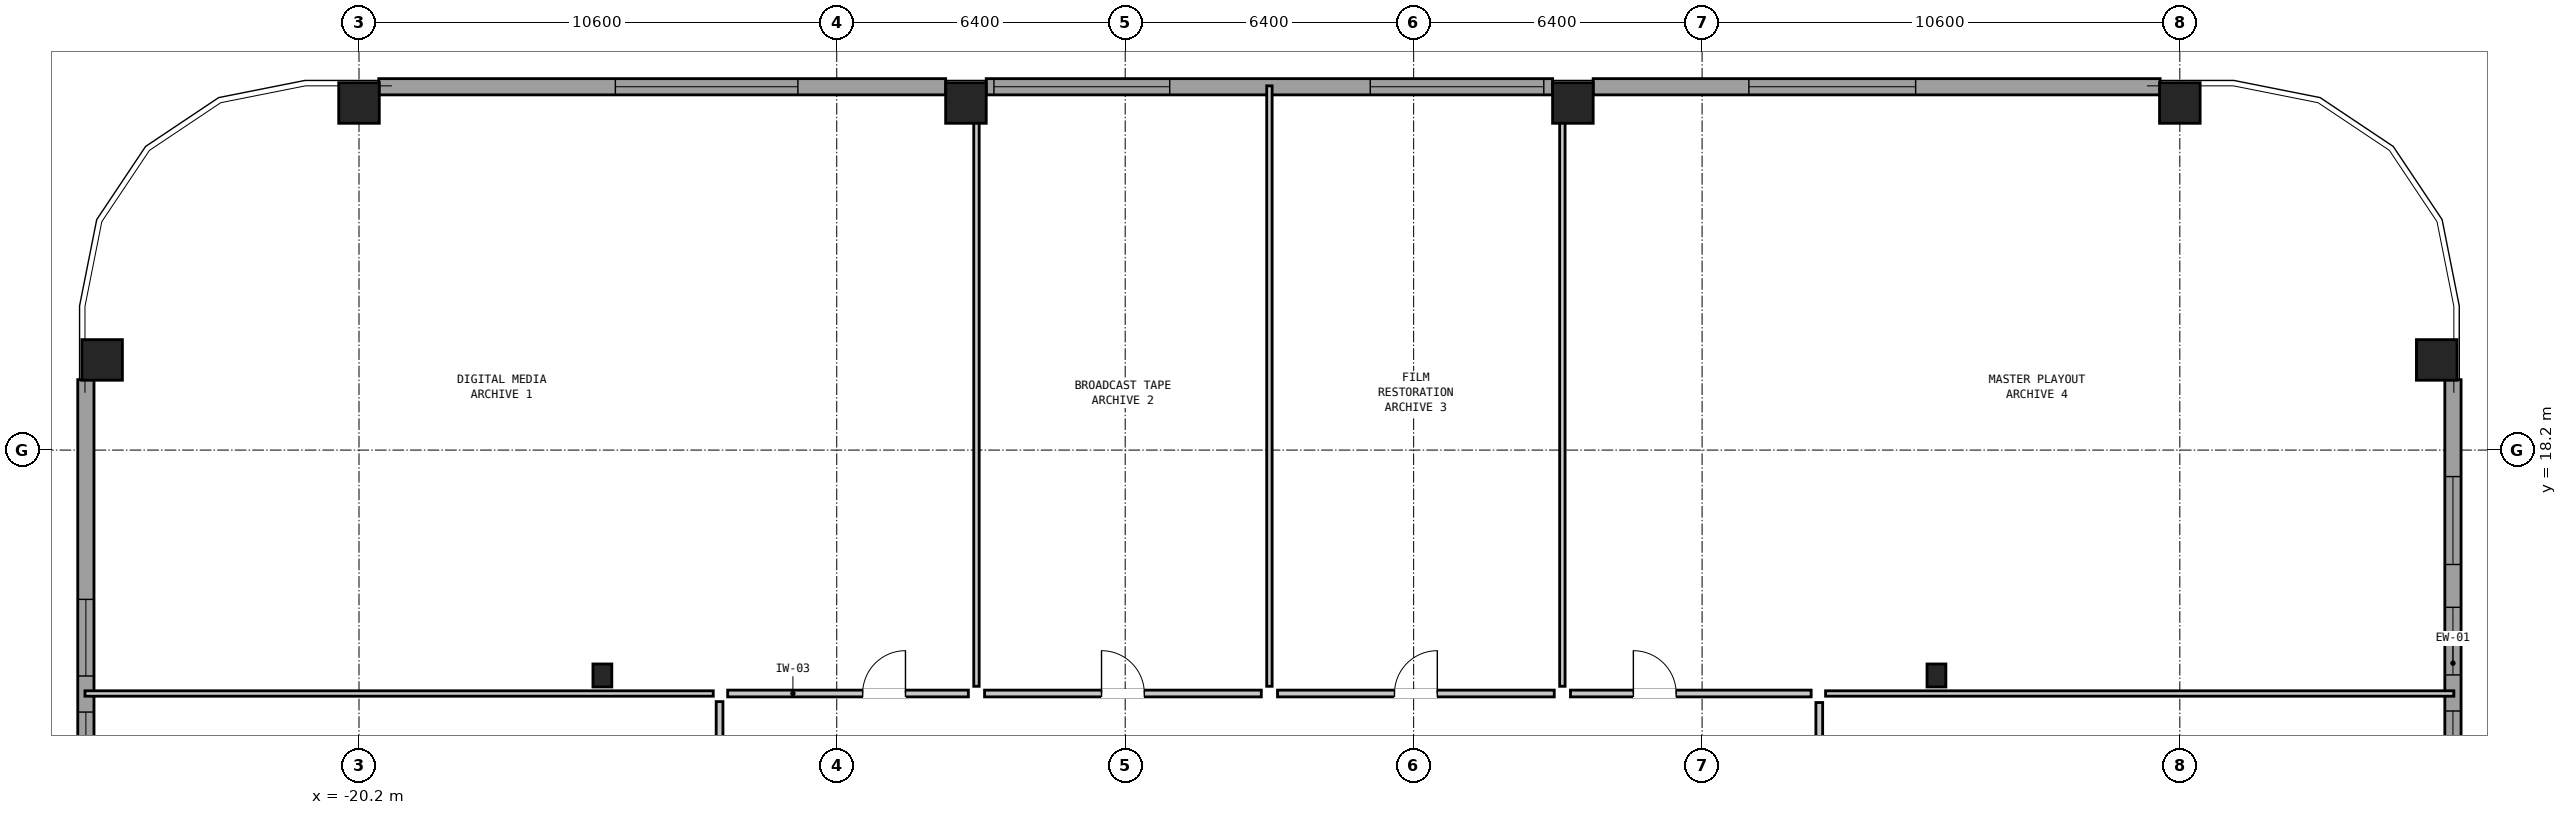
"""IFC4 building model, lengths in metres.
Left out: names, types, materials, properties, quantities, classifications, styles, units other than length and angle.
Written with IfcOpenShell. Run it as: python <this file> out.ifc"""

import sys

from ifc_helpers import new_model, si_unit, direction, frame, frame_2d, origin, origin_2d, place, context, subcontext, project, spatial, rectangle, hollow_rectangle, i_section, extrude, element, fill, save


model = new_model("IFC4")
c1 = context("Model", 3, precision=1e-05, world=origin(), true_north=direction((0.0, 1.0)))
c2 = subcontext(c1, "Body", "Model", "MODEL_VIEW")
j1 = project(units=[si_unit("LENGTHUNIT", "METRE"), si_unit("PLANEANGLEUNIT", "RADIAN")], contexts=[c1])
p1 = place(None, origin())
s1 = spatial("IfcSite", under=j1, at=p1, CompositionType="ELEMENT")
p2 = place(p1, origin())
s2 = spatial("IfcBuilding", under=s1, at=p2, CompositionType="ELEMENT")
p3 = place(p2, frame((0.0, 0.0, 44.4)))
s3 = spatial("IfcBuildingStorey", under=s2, at=p3, CompositionType="ELEMENT", Elevation=44.4)
for number, where, z_axis, x_axis in (
    (1, (25.9, 20.2, 0.0), (0.0, 0.0, 1.0), (0.0, 1.0, 0.0)),
    (2, (20.2, 25.9, 0.0), (0.0, 0.0, 1.0), (1.0, 0.0, 0.0)),
    (3, (6.733, 25.9, 0.0), (0.0, 0.0, 1.0), (1.0, 0.0, 0.0)),
    (4, (-6.733, 25.9, 0.0), (0.0, 0.0, 1.0), (1.0, 0.0, 0.0)),
    (5, (-20.2, 25.9, 0.0), (0.0, 0.0, 1.0), (1.0, 0.0, 0.0)),
    (6, (-25.9, 20.2, 0.0), (0.0, 0.0, 1.0), (0.0, 1.0, 0.0)),
):
    element("IfcColumn", number, at=place(p3, frame(where, z_axis=z_axis, x_axis=x_axis)), inside=s3, PredefinedType="COLUMN", context=c2, shape_type="SweptSolid", body=[
        extrude(hollow_rectangle(XDim=0.9, YDim=0.9, WallThickness=0.055, at=origin_2d()), origin(), (0.0, 0.0, 1.0), 3.05),
    ])
for number, where, z_axis, x_axis in (
    (7, (-14.8, 13.2, 0.0), (0.0, 0.0, 1.0), (1.0, 0.0, 0.0)),
    (8, (14.8, 13.2, 0.0), (0.0, 0.0, 1.0), (1.0, 0.0, 0.0)),
):
    element("IfcColumn", number, at=place(p3, frame(where, z_axis=z_axis, x_axis=x_axis)), inside=s3, PredefinedType="COLUMN", context=c2, shape_type="SweptSolid", body=[
        extrude(i_section(OverallWidth=0.418, OverallDepth=0.51, WebThickness=0.042, FlangeThickness=0.068, at=origin_2d()), origin(), (0.0, 0.0, 1.0), 3.05),
    ])
p4 = place(p3, frame((26.26, 19.762, 0.0), z_axis=(0.0, 0.0, 1.0), x_axis=(0.0, -1.0, 0.0)))
e9 = element("IfcWall", 9, at=p4, inside=s3, PredefinedType="SOLIDWALL", context=c2, shape_type="SweptSolid", body=[
    extrude(rectangle(XDim=12.579, YDim=0.36, at=frame_2d((6.289, 0.0))), origin(), (0.0, 0.0, 1.0), 2.067),
])
p5 = place(p4, frame((2.15, 0.0, 1.2)))
e10 = element("IfcOpeningElement", 10, at=p5, cuts=e9, PredefinedType="OPENING", context=c2, shape_type="SweptSolid", body=[
    extrude(rectangle(XDim=1.95, YDim=0.7, at=frame_2d((0.975, 0.35))), frame((0.0, 0.192, 0.0), z_axis=(0.0, -1.0, 0.0), x_axis=(1.0, 0.0, 0.0)), (0.0, 0.0, 1.0), 0.384),
])
p6 = place(p4, frame((5.05, 0.0, 0.2)))
e11 = element("IfcOpeningElement", 11, at=p6, cuts=e9, PredefinedType="OPENING", context=c2, shape_type="SweptSolid", body=[
    extrude(rectangle(XDim=1.5, YDim=0.95, at=frame_2d((0.75, 0.475))), frame((0.0, 0.192, 0.0), z_axis=(0.0, -1.0, 0.0), x_axis=(1.0, 0.0, 0.0)), (0.0, 0.0, 1.0), 0.384),
])
p7 = place(p4, frame((7.35, 0.0, 0.2)))
e12 = element("IfcOpeningElement", 12, at=p7, cuts=e9, PredefinedType="OPENING", context=c2, shape_type="SweptSolid", body=[
    extrude(rectangle(XDim=1.9, YDim=1.1, at=frame_2d((0.95, 0.55))), frame((0.0, 0.192, 0.0), z_axis=(0.0, -1.0, 0.0), x_axis=(1.0, 0.0, 0.0)), (0.0, 0.0, 1.0), 0.384),
])
p8 = place(p3, frame((-19.762, 26.26, 0.0), z_axis=(0.0, 0.0, 1.0), x_axis=(1.0, 0.0, 0.0)))
e13 = element("IfcWall", 13, at=p8, inside=s3, PredefinedType="SOLIDWALL", context=c2, shape_type="SweptSolid", body=[
    extrude(rectangle(XDim=12.579, YDim=0.36, at=frame_2d((6.289, 0.0))), origin(), (0.0, 0.0, 1.0), 2.067),
])
p9 = place(p8, frame((5.25, 0.0, 0.2)))
e14 = element("IfcOpeningElement", 14, at=p9, cuts=e13, PredefinedType="OPENING", context=c2, shape_type="SweptSolid", body=[
    extrude(rectangle(XDim=4.05, YDim=1.0, at=frame_2d((2.025, 0.5))), frame((0.0, 0.192, 0.0), z_axis=(0.0, -1.0, 0.0), x_axis=(1.0, 0.0, 0.0)), (0.0, 0.0, 1.0), 0.384),
])
p10 = place(p3, frame((-6.283, 26.26, 0.0), z_axis=(0.0, 0.0, 1.0), x_axis=(1.0, 0.0, 0.0)))
e15 = element("IfcWall", 15, at=p10, inside=s3, PredefinedType="SOLIDWALL", context=c2, shape_type="SweptSolid", body=[
    extrude(rectangle(XDim=12.566, YDim=0.36, at=frame_2d((6.283, 0.0))), origin(), (0.0, 0.0, 1.0), 2.067),
])
p11 = place(p10, frame((0.171, 0.0, 0.2)))
e16 = element("IfcOpeningElement", 16, at=p11, cuts=e15, PredefinedType="OPENING", context=c2, shape_type="SweptSolid", body=[
    extrude(rectangle(XDim=3.9, YDim=1.05, at=frame_2d((1.95, 0.525))), frame((0.0, 0.192, 0.0), z_axis=(0.0, -1.0, 0.0), x_axis=(1.0, 0.0, 0.0)), (0.0, 0.0, 1.0), 0.384),
])
p12 = place(p10, frame((8.521, 0.0, 0.2)))
e17 = element("IfcOpeningElement", 17, at=p12, cuts=e15, PredefinedType="OPENING", context=c2, shape_type="SweptSolid", body=[
    extrude(rectangle(XDim=3.85, YDim=1.05, at=frame_2d((1.925, 0.525))), frame((0.0, 0.192, 0.0), z_axis=(0.0, -1.0, 0.0), x_axis=(1.0, 0.0, 0.0)), (0.0, 0.0, 1.0), 0.384),
])
p13 = place(p3, frame((7.183, 26.26, 0.0), z_axis=(0.0, 0.0, 1.0), x_axis=(1.0, 0.0, 0.0)))
e18 = element("IfcWall", 18, at=p13, inside=s3, PredefinedType="SOLIDWALL", context=c2, shape_type="SweptSolid", body=[
    extrude(rectangle(XDim=12.579, YDim=0.36, at=frame_2d((6.289, 0.0))), origin(), (0.0, 0.0, 1.0), 2.067),
])
p14 = place(p13, frame((3.455, 0.0, 0.2)))
e19 = element("IfcOpeningElement", 19, at=p14, cuts=e18, PredefinedType="OPENING", context=c2, shape_type="SweptSolid", body=[
    extrude(rectangle(XDim=3.7, YDim=1.1, at=frame_2d((1.85, 0.55))), frame((0.0, 0.192, 0.0), z_axis=(0.0, -1.0, 0.0), x_axis=(1.0, 0.0, 0.0)), (0.0, 0.0, 1.0), 0.384),
])
p15 = place(p3, frame((-26.26, 7.183, 0.0), z_axis=(0.0, 0.0, 1.0), x_axis=(0.0, 1.0, 0.0)))
e20 = element("IfcWall", 20, at=p15, inside=s3, PredefinedType="SOLIDWALL", context=c2, shape_type="SweptSolid", body=[
    extrude(rectangle(XDim=12.579, YDim=0.36, at=frame_2d((6.289, 0.0))), origin(), (0.0, 0.0, 1.0), 2.067),
])
p16 = place(p15, frame((0.155, 0.0, 1.2)))
e21 = element("IfcOpeningElement", 21, at=p16, cuts=e20, PredefinedType="OPENING", context=c2, shape_type="SweptSolid", body=[
    extrude(rectangle(XDim=1.95, YDim=0.7, at=frame_2d((0.975, 0.35))), frame((0.0, 0.192, 0.0), z_axis=(0.0, -1.0, 0.0), x_axis=(1.0, 0.0, 0.0)), (0.0, 0.0, 1.0), 0.384),
])
p17 = place(p15, frame((3.155, 0.0, 0.2)))
e22 = element("IfcOpeningElement", 22, at=p17, cuts=e20, PredefinedType="OPENING", context=c2, shape_type="SweptSolid", body=[
    extrude(rectangle(XDim=2.05, YDim=1.0, at=frame_2d((1.025, 0.5))), frame((0.0, 0.192, 0.0), z_axis=(0.0, -1.0, 0.0), x_axis=(1.0, 0.0, 0.0)), (0.0, 0.0, 1.0), 0.384),
])
p18 = place(p15, frame((6.005, 0.0, 0.2)))
e23 = element("IfcOpeningElement", 23, at=p18, cuts=e20, PredefinedType="OPENING", context=c2, shape_type="SweptSolid", body=[
    extrude(rectangle(XDim=1.7, YDim=0.85, at=frame_2d((0.85, 0.425))), frame((0.0, 0.192, 0.0), z_axis=(0.0, -1.0, 0.0), x_axis=(1.0, 0.0, 0.0)), (0.0, 0.0, 1.0), 0.384),
])
for number, where, z_axis, x_axis in (
    (24, (-26.28, 12.8, 0.0), (0.0, 0.0, 1.0), (1.0, 0.0, 0.0)),
    (25, (12.34, 12.8, 0.0), (0.0, 0.0, 1.0), (1.0, 0.0, 0.0)),
):
    element("IfcWall", number, at=place(p3, frame(where, z_axis=z_axis, x_axis=x_axis)), inside=s3, PredefinedType="PARTITIONING", context=c2, shape_type="SweptSolid", body=[
        extrude(rectangle(XDim=13.94, YDim=0.12, at=frame_2d((6.97, 0.0))), origin(), (0.0, 0.0, 1.0), 2.83),
    ])
for number, where, z_axis, x_axis in (
    (26, (-6.5, 12.96, 0.0), (0.0, 0.0, 1.0), (0.0, 1.0, 0.0)),
    (27, (0.0, 12.96, 0.0), (0.0, 0.0, 1.0), (0.0, 1.0, 0.0)),
    (28, (6.5, 12.96, 0.0), (0.0, 0.0, 1.0), (0.0, 1.0, 0.0)),
):
    element("IfcWall", number, at=place(p3, frame(where, z_axis=z_axis, x_axis=x_axis)), inside=s3, PredefinedType="PARTITIONING", context=c2, shape_type="SweptSolid", body=[
        extrude(rectangle(XDim=13.32, YDim=0.12, at=frame_2d((6.66, 0.0))), origin(), (0.0, 0.0, 1.0), 2.274),
    ])
p19 = place(p3, frame((-12.02, 12.8, 0.0), z_axis=(0.0, 0.0, 1.0), x_axis=(1.0, 0.0, 0.0)))
e29 = element("IfcWall", 29, at=p19, inside=s3, PredefinedType="PARTITIONING", context=c2, shape_type="SweptSolid", body=[
    extrude(rectangle(XDim=5.34, YDim=0.15, at=frame_2d((2.67, 0.0))), origin(), (0.0, 0.0, 1.0), 2.83),
])
p20 = place(p19, frame((2.995, 0.0, 0.0)))
e30 = element("IfcOpeningElement", 30, at=p20, cuts=e29, PredefinedType="OPENING", context=c2, shape_type="SweptSolid", body=[
    extrude(rectangle(XDim=0.95, YDim=2.1, at=frame_2d((0.475, 1.05))), frame((0.0, 0.087, 0.0), z_axis=(0.0, -1.0, 0.0), x_axis=(1.0, 0.0, 0.0)), (0.0, 0.0, 1.0), 0.174),
])
p21 = place(p3, frame((-6.32, 12.8, 0.0), z_axis=(0.0, 0.0, 1.0), x_axis=(1.0, 0.0, 0.0)))
e31 = element("IfcWall", 31, at=p21, inside=s3, PredefinedType="PARTITIONING", context=c2, shape_type="SweptSolid", body=[
    extrude(rectangle(XDim=6.14, YDim=0.15, at=frame_2d((3.07, 0.0))), origin(), (0.0, 0.0, 1.0), 2.83),
])
p22 = place(p21, frame((2.595, 0.0, 0.0)))
e32 = element("IfcOpeningElement", 32, at=p22, cuts=e31, PredefinedType="OPENING", context=c2, shape_type="SweptSolid", body=[
    extrude(rectangle(XDim=0.95, YDim=2.1, at=frame_2d((0.475, 1.05))), frame((0.0, 0.087, 0.0), z_axis=(0.0, -1.0, 0.0), x_axis=(1.0, 0.0, 0.0)), (0.0, 0.0, 1.0), 0.174),
])
p23 = place(p3, frame((0.18, 12.8, 0.0), z_axis=(0.0, 0.0, 1.0), x_axis=(1.0, 0.0, 0.0)))
e33 = element("IfcWall", 33, at=p23, inside=s3, PredefinedType="PARTITIONING", context=c2, shape_type="SweptSolid", body=[
    extrude(rectangle(XDim=6.14, YDim=0.15, at=frame_2d((3.07, 0.0))), origin(), (0.0, 0.0, 1.0), 2.83),
])
p24 = place(p23, frame((2.595, 0.0, 0.0)))
e34 = element("IfcOpeningElement", 34, at=p24, cuts=e33, PredefinedType="OPENING", context=c2, shape_type="SweptSolid", body=[
    extrude(rectangle(XDim=0.95, YDim=2.1, at=frame_2d((0.475, 1.05))), frame((0.0, 0.087, 0.0), z_axis=(0.0, -1.0, 0.0), x_axis=(1.0, 0.0, 0.0)), (0.0, 0.0, 1.0), 0.174),
])
p25 = place(p3, frame((6.68, 12.8, 0.0), z_axis=(0.0, 0.0, 1.0), x_axis=(1.0, 0.0, 0.0)))
e35 = element("IfcWall", 35, at=p25, inside=s3, PredefinedType="PARTITIONING", context=c2, shape_type="SweptSolid", body=[
    extrude(rectangle(XDim=5.34, YDim=0.15, at=frame_2d((2.67, 0.0))), origin(), (0.0, 0.0, 1.0), 2.83),
])
p26 = place(p25, frame((1.395, 0.0, 0.0)))
e36 = element("IfcOpeningElement", 36, at=p26, cuts=e35, PredefinedType="OPENING", context=c2, shape_type="SweptSolid", body=[
    extrude(rectangle(XDim=0.95, YDim=2.1, at=frame_2d((0.475, 1.05))), frame((0.0, 0.087, 0.0), z_axis=(0.0, -1.0, 0.0), x_axis=(1.0, 0.0, 0.0)), (0.0, 0.0, 1.0), 0.174),
])
p27 = place(p3, frame((-12.2, 3.68, 0.0), z_axis=(0.0, 0.0, 1.0), x_axis=(0.0, 1.0, 0.0)))
e37 = element("IfcWall", 37, at=p27, inside=s3, PredefinedType="PARTITIONING", context=c2, shape_type="SweptSolid", body=[
    extrude(rectangle(XDim=8.94, YDim=0.15, at=frame_2d((4.47, 0.0))), origin(), (0.0, 0.0, 1.0), 2.83),
])
p28 = place(p27, frame((3.995, 0.0, 0.0)))
e38 = element("IfcOpeningElement", 38, at=p28, cuts=e37, PredefinedType="OPENING", context=c2, shape_type="SweptSolid", body=[
    extrude(rectangle(XDim=0.95, YDim=2.1, at=frame_2d((0.475, 1.05))), frame((0.0, 0.087, 0.0), z_axis=(0.0, -1.0, 0.0), x_axis=(1.0, 0.0, 0.0)), (0.0, 0.0, 1.0), 0.174),
])
p29 = place(p3, frame((12.2, 3.8, 0.0), z_axis=(0.0, 0.0, 1.0), x_axis=(0.0, 1.0, 0.0)))
e39 = element("IfcWall", 39, at=p29, inside=s3, PredefinedType="PARTITIONING", context=c2, shape_type="SweptSolid", body=[
    extrude(rectangle(XDim=8.8, YDim=0.15, at=frame_2d((4.4, 0.0))), origin(), (0.0, 0.0, 1.0), 2.83),
])
p30 = place(p29, frame((3.925, 0.0, 0.0)))
e40 = element("IfcOpeningElement", 40, at=p30, cuts=e39, PredefinedType="OPENING", context=c2, shape_type="SweptSolid", body=[
    extrude(rectangle(XDim=0.95, YDim=2.1, at=frame_2d((0.475, 1.05))), frame((0.0, 0.087, 0.0), z_axis=(0.0, -1.0, 0.0), x_axis=(1.0, 0.0, 0.0)), (0.0, 0.0, 1.0), 0.174),
])
p31 = place(p5, origin())
e41 = element("IfcWindow", 41, at=p31, inside=s3, PartitioningType="SINGLE_PANEL", PredefinedType="WINDOW", context=c2, shape_type="SweptSolid", body=[
    extrude(rectangle(XDim=1.95, YDim=0.7, at=frame_2d((0.975, 0.35))), frame((0.0, 0.03, 0.0), z_axis=(0.0, -1.0, 0.0), x_axis=(1.0, 0.0, 0.0)), (0.0, 0.0, 1.0), 0.06),
])
fill(e10, e41)
p32 = place(p6, origin())
e42 = element("IfcWindow", 42, at=p32, inside=s3, PartitioningType="SINGLE_PANEL", PredefinedType="WINDOW", context=c2, shape_type="SweptSolid", body=[
    extrude(rectangle(XDim=1.5, YDim=0.95, at=frame_2d((0.75, 0.475))), frame((0.0, 0.03, 0.0), z_axis=(0.0, -1.0, 0.0), x_axis=(1.0, 0.0, 0.0)), (0.0, 0.0, 1.0), 0.06),
])
fill(e11, e42)
p33 = place(p7, origin())
e43 = element("IfcWindow", 43, at=p33, inside=s3, PartitioningType="SINGLE_PANEL", PredefinedType="WINDOW", context=c2, shape_type="SweptSolid", body=[
    extrude(rectangle(XDim=1.9, YDim=1.1, at=frame_2d((0.95, 0.55))), frame((0.0, 0.03, 0.0), z_axis=(0.0, -1.0, 0.0), x_axis=(1.0, 0.0, 0.0)), (0.0, 0.0, 1.0), 0.06),
])
fill(e12, e43)
p34 = place(p9, origin())
e44 = element("IfcWindow", 44, at=p34, inside=s3, PartitioningType="SINGLE_PANEL", PredefinedType="WINDOW", context=c2, shape_type="SweptSolid", body=[
    extrude(rectangle(XDim=4.05, YDim=1.0, at=frame_2d((2.025, 0.5))), frame((0.0, 0.03, 0.0), z_axis=(0.0, -1.0, 0.0), x_axis=(1.0, 0.0, 0.0)), (0.0, 0.0, 1.0), 0.06),
])
fill(e14, e44)
p35 = place(p11, origin())
e45 = element("IfcWindow", 45, at=p35, inside=s3, PartitioningType="SINGLE_PANEL", PredefinedType="WINDOW", context=c2, shape_type="SweptSolid", body=[
    extrude(rectangle(XDim=3.9, YDim=1.05, at=frame_2d((1.95, 0.525))), frame((0.0, 0.03, 0.0), z_axis=(0.0, -1.0, 0.0), x_axis=(1.0, 0.0, 0.0)), (0.0, 0.0, 1.0), 0.06),
])
fill(e16, e45)
p36 = place(p12, origin())
e46 = element("IfcWindow", 46, at=p36, inside=s3, PartitioningType="SINGLE_PANEL", PredefinedType="WINDOW", context=c2, shape_type="SweptSolid", body=[
    extrude(rectangle(XDim=3.85, YDim=1.05, at=frame_2d((1.925, 0.525))), frame((0.0, 0.03, 0.0), z_axis=(0.0, -1.0, 0.0), x_axis=(1.0, 0.0, 0.0)), (0.0, 0.0, 1.0), 0.06),
])
fill(e17, e46)
p37 = place(p14, origin())
e47 = element("IfcWindow", 47, at=p37, inside=s3, PartitioningType="SINGLE_PANEL", PredefinedType="WINDOW", context=c2, shape_type="SweptSolid", body=[
    extrude(rectangle(XDim=3.7, YDim=1.1, at=frame_2d((1.85, 0.55))), frame((0.0, 0.03, 0.0), z_axis=(0.0, -1.0, 0.0), x_axis=(1.0, 0.0, 0.0)), (0.0, 0.0, 1.0), 0.06),
])
fill(e19, e47)
p38 = place(p17, origin())
e48 = element("IfcWindow", 48, at=p38, inside=s3, PartitioningType="SINGLE_PANEL", PredefinedType="WINDOW", context=c2, shape_type="SweptSolid", body=[
    extrude(rectangle(XDim=2.05, YDim=1.0, at=frame_2d((1.025, 0.5))), frame((0.0, 0.03, 0.0), z_axis=(0.0, -1.0, 0.0), x_axis=(1.0, 0.0, 0.0)), (0.0, 0.0, 1.0), 0.06),
])
fill(e22, e48)
p39 = place(p18, origin())
e49 = element("IfcWindow", 49, at=p39, inside=s3, PartitioningType="SINGLE_PANEL", PredefinedType="WINDOW", context=c2, shape_type="SweptSolid", body=[
    extrude(rectangle(XDim=1.7, YDim=0.85, at=frame_2d((0.85, 0.425))), frame((0.0, 0.03, 0.0), z_axis=(0.0, -1.0, 0.0), x_axis=(1.0, 0.0, 0.0)), (0.0, 0.0, 1.0), 0.06),
])
fill(e23, e49)
p40 = place(p20, origin())
e50 = element("IfcDoor", 50, at=p40, inside=s3, OperationType="SINGLE_SWING_RIGHT", PredefinedType="DOOR", context=c2, shape_type="SweptSolid", body=[
    extrude(rectangle(XDim=0.95, YDim=2.1, at=frame_2d((0.475, 1.05))), frame((0.0, 0.025, 0.0), z_axis=(0.0, -1.0, 0.0), x_axis=(1.0, 0.0, 0.0)), (0.0, 0.0, 1.0), 0.05),
])
fill(e30, e50)
p41 = place(p22, origin())
e51 = element("IfcDoor", 51, at=p41, inside=s3, OperationType="SINGLE_SWING_LEFT", PredefinedType="DOOR", context=c2, shape_type="SweptSolid", body=[
    extrude(rectangle(XDim=0.95, YDim=2.1, at=frame_2d((0.475, 1.05))), frame((0.0, 0.025, 0.0), z_axis=(0.0, -1.0, 0.0), x_axis=(1.0, 0.0, 0.0)), (0.0, 0.0, 1.0), 0.05),
])
fill(e32, e51)
p42 = place(p24, origin())
e52 = element("IfcDoor", 52, at=p42, inside=s3, OperationType="SINGLE_SWING_RIGHT", PredefinedType="DOOR", context=c2, shape_type="SweptSolid", body=[
    extrude(rectangle(XDim=0.95, YDim=2.1, at=frame_2d((0.475, 1.05))), frame((0.0, 0.025, 0.0), z_axis=(0.0, -1.0, 0.0), x_axis=(1.0, 0.0, 0.0)), (0.0, 0.0, 1.0), 0.05),
])
fill(e34, e52)
p43 = place(p26, origin())
e53 = element("IfcDoor", 53, at=p43, inside=s3, OperationType="SINGLE_SWING_LEFT", PredefinedType="DOOR", context=c2, shape_type="SweptSolid", body=[
    extrude(rectangle(XDim=0.95, YDim=2.1, at=frame_2d((0.475, 1.05))), frame((0.0, 0.025, 0.0), z_axis=(0.0, -1.0, 0.0), x_axis=(1.0, 0.0, 0.0)), (0.0, 0.0, 1.0), 0.05),
])
fill(e36, e53)
save(model, sys.argv[1])
